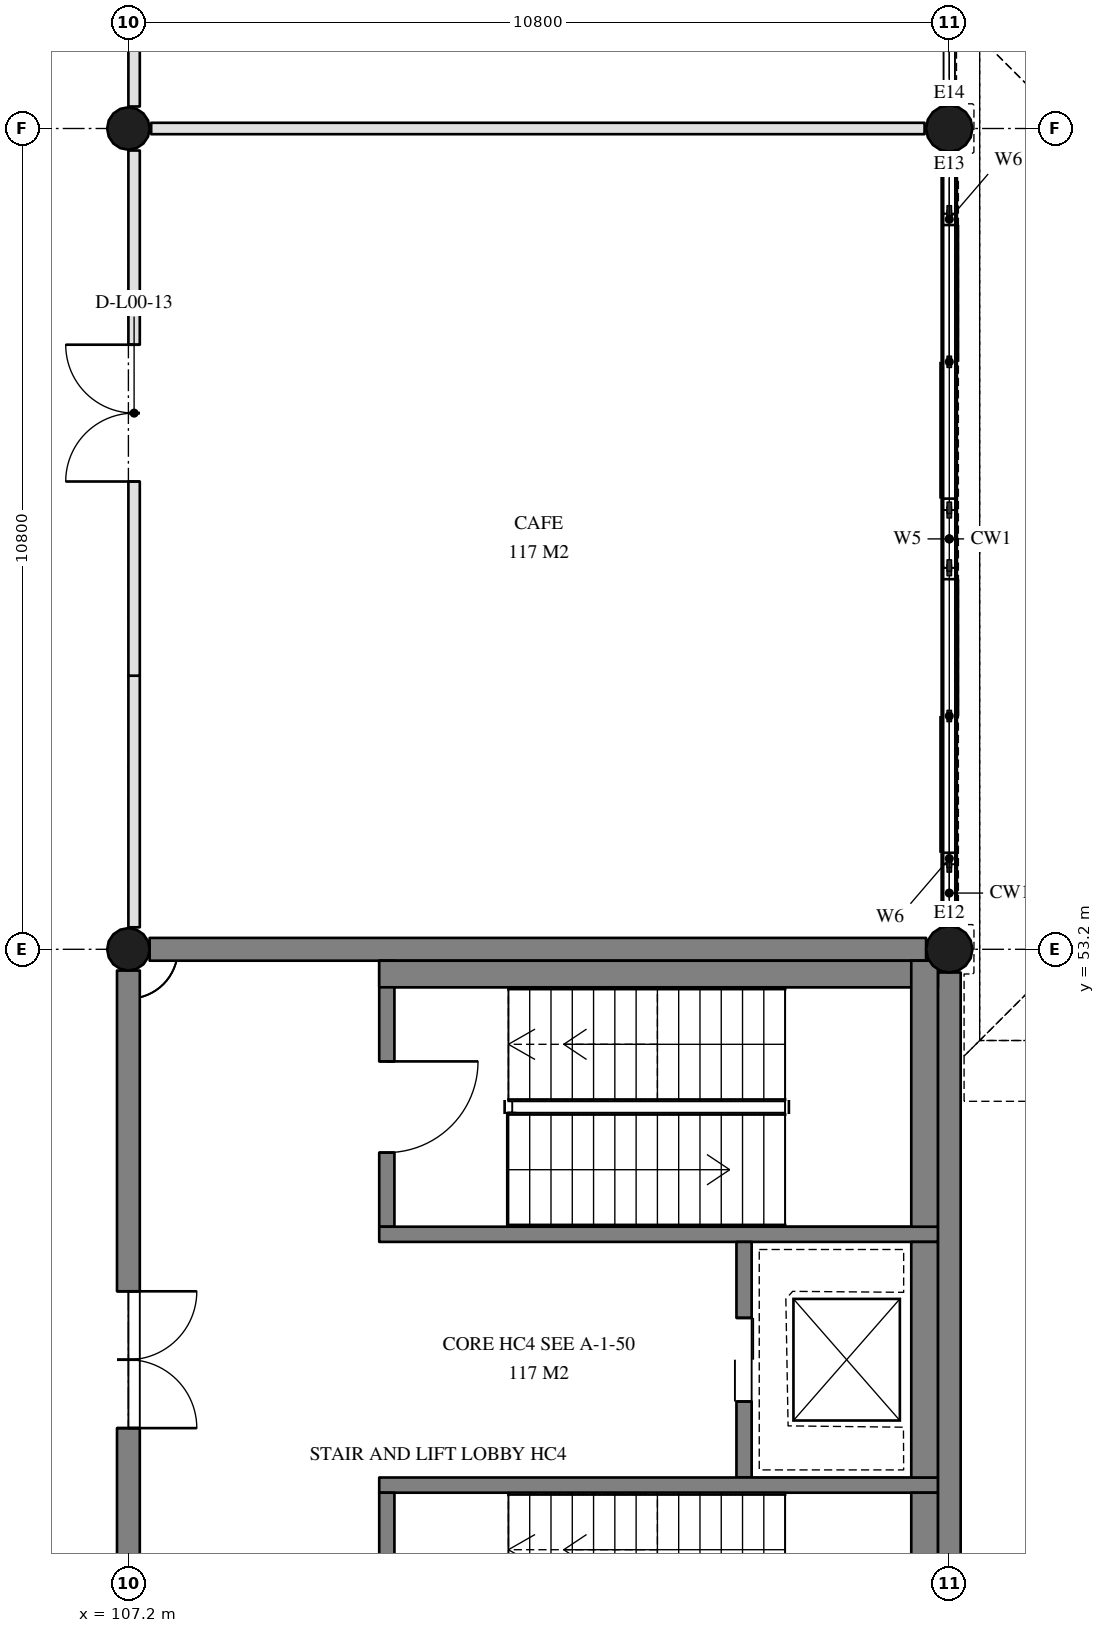
"""IFC4 building model, lengths in metres.
Left out: names, types, materials, properties, quantities, classifications, styles, units other than length and angle.
Written with IfcOpenShell. Run it as: python <this file> out.ifc"""

import sys

from ifc_helpers import new_model, si_unit, direction, frame, frame_2d, origin, origin_2d, place, context, subcontext, project, spatial, rectangle, hollow_circle, extrude, element, fill, save


model = new_model("IFC4")
c1 = context("Model", 3, precision=1e-05, world=origin(), true_north=direction((0.0, 1.0)))
c2 = subcontext(c1, "Body", "Model", "MODEL_VIEW")
j1 = project(units=[si_unit("LENGTHUNIT", "METRE"), si_unit("PLANEANGLEUNIT", "RADIAN")], contexts=[c1])
p1 = place(None, origin())
s1 = spatial("IfcSite", under=j1, at=p1, CompositionType="ELEMENT")
p2 = place(p1, origin())
s2 = spatial("IfcBuilding", under=s1, at=p2, CompositionType="ELEMENT")
p3 = place(p2, origin())
s3 = spatial("IfcBuildingStorey", under=s2, at=p3, CompositionType="ELEMENT", Elevation=0.0)
for number, where, z_axis, x_axis in (
    (1, (107.2, 53.2, 0.0), (0.0, 0.0, 1.0), (1.0, 0.0, 0.0)),
    (2, (107.2, 64.0, 0.0), (0.0, 0.0, 1.0), (1.0, 0.0, 0.0)),
):
    element("IfcColumn", number, at=place(p3, frame(where, z_axis=z_axis, x_axis=x_axis)), inside=s3, PredefinedType="COLUMN", context=c2, shape_type="SweptSolid", body=[
        extrude(hollow_circle(Radius=0.28, WallThickness=0.02, at=origin_2d()), origin(), (0.0, 0.0, 1.0), 4.8),
    ])
for number, where, z_axis, x_axis in (
    (3, (118.0, 53.2, 0.0), (0.0, 0.0, 1.0), (1.0, 0.0, 0.0)),
    (4, (118.0, 64.0, 0.0), (0.0, 0.0, 1.0), (1.0, 0.0, 0.0)),
):
    element("IfcColumn", number, at=place(p3, frame(where, z_axis=z_axis, x_axis=x_axis)), inside=s3, PredefinedType="COLUMN", context=c2, shape_type="SweptSolid", body=[
        extrude(hollow_circle(Radius=0.305, WallThickness=0.025, at=origin_2d()), origin(), (0.0, 0.0, 1.0), 4.8),
    ])
p4 = place(p3, frame((118.0, 42.705, 0.0), z_axis=(0.0, 0.0, 1.0), x_axis=(0.0, 1.0, 0.0)))
e5 = element("IfcWall", 5, at=p4, inside=s3, PredefinedType="SOLIDWALL", context=c2, shape_type="SweptSolid", body=[
    extrude(rectangle(XDim=10.19, YDim=0.3, at=frame_2d((5.095, 0.0))), origin(), (0.0, 0.0, 1.0), 4.8),
])
p5 = place(p3, frame((117.695, 53.2, 0.0), z_axis=(0.0, 0.0, 1.0), x_axis=(-1.0, 0.0, 0.0)))
e6 = element("IfcWall", 6, at=p5, inside=s3, PredefinedType="SOLIDWALL", context=c2, shape_type="SweptSolid", body=[
    extrude(rectangle(XDim=10.216, YDim=0.3, at=frame_2d((5.108, 0.0))), origin(), (0.0, 0.0, 1.0), 4.8),
])
p6 = place(p3, frame((107.2, 52.92, 0.0), z_axis=(0.0, 0.0, 1.0), x_axis=(0.0, -1.0, 0.0)))
e7 = element("IfcWall", 7, at=p6, inside=s3, PredefinedType="SOLIDWALL", context=c2, shape_type="SweptSolid", body=[
    extrude(rectangle(XDim=10.215, YDim=0.3, at=frame_2d((5.108, 0.0))), origin(), (0.0, 0.0, 1.0), 4.8),
])
p7 = place(p6, frame((4.22, 0.0, 0.0)))
e8 = element("IfcOpeningElement", 8, at=p7, cuts=e7, PredefinedType="OPENING", context=c2, shape_type="SweptSolid", body=[
    extrude(rectangle(XDim=1.8, YDim=2.1, at=frame_2d((0.9, 1.05))), frame((0.0, 0.16, 0.0), z_axis=(0.0, -1.0, 0.0), x_axis=(1.0, 0.0, 0.0)), (0.0, 0.0, 1.0), 0.32),
])
p8 = place(p3, frame((118.0, 53.48, 4.5), z_axis=(0.0, 0.0, 1.0), x_axis=(0.0, 1.0, 0.0)))
e9 = element("IfcWall", 9, at=p8, inside=s3, PredefinedType="SOLIDWALL", context=c2, shape_type="SweptSolid", body=[
    extrude(rectangle(XDim=10.24, YDim=0.2, at=frame_2d((5.12, 0.0))), origin(), (0.0, 0.0, 1.0), 0.3),
])
p9 = place(p3, frame((118.0, 54.32, 0.0), z_axis=(0.0, 0.0, 1.0), x_axis=(0.0, 1.0, 0.0)))
e10 = element("IfcWall", 10, at=p9, inside=s3, PredefinedType="SOLIDWALL", context=c2, shape_type="SweptSolid", body=[
    extrude(rectangle(XDim=3.9, YDim=0.15, at=frame_2d((1.95, 0.0))), origin(), (0.0, 0.0, 1.0), 2.6),
])
p10 = place(p9, frame((0.15, 0.0, 0.0)))
e11 = element("IfcOpeningElement", 11, at=p10, cuts=e10, PredefinedType="OPENING", context=c2, shape_type="SweptSolid", body=[
    extrude(rectangle(XDim=3.6, YDim=2.4, at=frame_2d((1.8, 1.2))), frame((0.0, 0.085, 0.0), z_axis=(0.0, -1.0, 0.0), x_axis=(1.0, 0.0, 0.0)), (0.0, 0.0, 1.0), 0.17),
])
p11 = place(p3, frame((118.0, 58.98, 0.0), z_axis=(0.0, 0.0, 1.0), x_axis=(0.0, 1.0, 0.0)))
e12 = element("IfcWall", 12, at=p11, inside=s3, PredefinedType="SOLIDWALL", context=c2, shape_type="SweptSolid", body=[
    extrude(rectangle(XDim=3.9, YDim=0.15, at=frame_2d((1.95, 0.0))), origin(), (0.0, 0.0, 1.0), 2.6),
])
p12 = place(p11, frame((0.15, 0.0, 0.0)))
e13 = element("IfcOpeningElement", 13, at=p12, cuts=e12, PredefinedType="OPENING", context=c2, shape_type="SweptSolid", body=[
    extrude(rectangle(XDim=3.6, YDim=2.4, at=frame_2d((1.8, 1.2))), frame((0.0, 0.085, 0.0), z_axis=(0.0, -1.0, 0.0), x_axis=(1.0, 0.0, 0.0)), (0.0, 0.0, 1.0), 0.17),
])
p13 = place(p3, frame((110.6, 53.05, 0.0), z_axis=(0.0, 0.0, 1.0), x_axis=(0.0, -1.0, 0.0)))
e14 = element("IfcWall", 14, at=p13, inside=s3, PredefinedType="SOLIDWALL", context=c2, shape_type="SweptSolid", body=[
    extrude(rectangle(XDim=3.5, YDim=0.2, at=frame_2d((1.75, 0.0))), origin(), (0.0, 0.0, 1.0), 4.4),
])
p14 = place(p13, frame((1.325, 0.0, 0.0)))
e15 = element("IfcOpeningElement", 15, at=p14, cuts=e14, PredefinedType="OPENING", context=c2, shape_type="SweptSolid", body=[
    extrude(rectangle(XDim=1.2, YDim=2.1, at=frame_2d((0.6, 1.05))), frame((0.0, 0.11, 0.0), z_axis=(0.0, -1.0, 0.0), x_axis=(1.0, 0.0, 0.0)), (0.0, 0.0, 1.0), 0.22),
])
p15 = place(p3, frame((110.5, 49.45, 0.0), z_axis=(0.0, 0.0, 1.0), x_axis=(1.0, 0.0, 0.0)))
e16 = element("IfcWall", 16, at=p15, inside=s3, PredefinedType="SOLIDWALL", context=c2, shape_type="SweptSolid", body=[
    extrude(rectangle(XDim=7.35, YDim=0.2, at=frame_2d((3.675, 0.0))), origin(), (0.0, 0.0, 1.0), 4.4),
])
p16 = place(p3, frame((115.3, 49.35, 0.0), z_axis=(0.0, 0.0, 1.0), x_axis=(0.0, -1.0, 0.0)))
e17 = element("IfcWall", 17, at=p16, inside=s3, PredefinedType="SOLIDWALL", context=c2, shape_type="SweptSolid", body=[
    extrude(rectangle(XDim=3.1, YDim=0.2, at=frame_2d((1.55, 0.0))), origin(), (0.0, 0.0, 1.0), 4.4),
])
p17 = place(p16, frame((1.0, 0.0, 0.0)))
e18 = element("IfcOpeningElement", 18, at=p17, cuts=e17, PredefinedType="OPENING", context=c2, shape_type="SweptSolid", body=[
    extrude(rectangle(XDim=1.1, YDim=2.1, at=frame_2d((0.55, 1.05))), frame((0.0, 0.11, 0.0), z_axis=(0.0, -1.0, 0.0), x_axis=(1.0, 0.0, 0.0)), (0.0, 0.0, 1.0), 0.22),
])
p18 = place(p3, frame((110.5, 46.15, 0.0), z_axis=(0.0, 0.0, 1.0), x_axis=(1.0, 0.0, 0.0)))
e19 = element("IfcWall", 19, at=p18, inside=s3, PredefinedType="SOLIDWALL", context=c2, shape_type="SweptSolid", body=[
    extrude(rectangle(XDim=7.35, YDim=0.2, at=frame_2d((3.675, 0.0))), origin(), (0.0, 0.0, 1.0), 4.4),
])
p19 = place(p3, frame((110.6, 46.05, 0.0), z_axis=(0.0, 0.0, 1.0), x_axis=(0.0, -1.0, 0.0)))
e20 = element("IfcWall", 20, at=p19, inside=s3, PredefinedType="SOLIDWALL", context=c2, shape_type="SweptSolid", body=[
    extrude(rectangle(XDim=3.5, YDim=0.2, at=frame_2d((1.75, 0.0))), origin(), (0.0, 0.0, 1.0), 4.4),
])
p20 = place(p19, frame((0.975, 0.0, 0.0)))
e21 = element("IfcOpeningElement", 21, at=p20, cuts=e20, PredefinedType="OPENING", context=c2, shape_type="SweptSolid", body=[
    extrude(rectangle(XDim=1.2, YDim=2.1, at=frame_2d((0.6, 1.05))), frame((0.0, 0.11, 0.0), z_axis=(0.0, -1.0, 0.0), x_axis=(1.0, 0.0, 0.0)), (0.0, 0.0, 1.0), 0.22),
])
p21 = place(p3, frame((110.5, 52.875, -0.6), z_axis=(0.0, 0.0, 1.0), x_axis=(1.0, 0.0, 0.0)))
e22 = element("IfcWall", 22, at=p21, inside=s3, PredefinedType="SOLIDWALL", context=c2, shape_type="SweptSolid", body=[
    extrude(rectangle(XDim=7.35, YDim=0.35, at=frame_2d((3.675, 0.0))), origin(), (0.0, 0.0, 1.0), 5.0),
])
for number, where, z_axis, x_axis in (
    (23, (117.675, 53.05, -0.6), (0.0, 0.0, 1.0), (0.0, -1.0, 0.0)),
    (24, (117.675, 46.05, -0.6), (0.0, 0.0, 1.0), (0.0, -1.0, 0.0)),
):
    element("IfcWall", number, at=place(p3, frame(where, z_axis=z_axis, x_axis=x_axis)), inside=s3, PredefinedType="SOLIDWALL", context=c2, shape_type="SweptSolid", body=[
        extrude(rectangle(XDim=3.5, YDim=0.35, at=frame_2d((1.75, 0.0))), origin(), (0.0, 0.0, 1.0), 5.0),
    ])
p22 = place(p3, frame((117.675, 49.35, -0.6), z_axis=(0.0, 0.0, 1.0), x_axis=(0.0, -1.0, 0.0)))
e25 = element("IfcWall", 25, at=p22, inside=s3, PredefinedType="SOLIDWALL", context=c2, shape_type="SweptSolid", body=[
    extrude(rectangle(XDim=3.1, YDim=0.35, at=frame_2d((1.55, 0.0))), origin(), (0.0, 0.0, 1.0), 5.0),
])
p23 = place(p3, frame((107.275, 53.49, 0.0), z_axis=(0.0, 0.0, 1.0), x_axis=(0.0, 1.0, 0.0)))
e26 = element("IfcWall", 26, at=p23, inside=s3, PredefinedType="PARTITIONING", context=c2, shape_type="SweptSolid", body=[
    extrude(rectangle(XDim=3.311, YDim=0.15, at=frame_2d((1.655, 0.0))), origin(), (0.0, 0.0, 1.0), 3.9),
])
p24 = place(p3, frame((107.275, 56.8, 0.0), z_axis=(0.0, 0.0, 1.0), x_axis=(0.0, 1.0, 0.0)))
e27 = element("IfcWall", 27, at=p24, inside=s3, PredefinedType="PARTITIONING", context=c2, shape_type="SweptSolid", body=[
    extrude(rectangle(XDim=6.91, YDim=0.15, at=frame_2d((3.455, 0.0))), origin(), (0.0, 0.0, 1.0), 3.9),
])
p25 = place(p24, frame((2.555, 0.0, 0.0)))
e28 = element("IfcOpeningElement", 28, at=p25, cuts=e27, PredefinedType="OPENING", context=c2, shape_type="SweptSolid", body=[
    extrude(rectangle(XDim=1.8, YDim=2.1, at=frame_2d((0.9, 1.05))), frame((0.0, 0.085, 0.0), z_axis=(0.0, -1.0, 0.0), x_axis=(1.0, 0.0, 0.0)), (0.0, 0.0, 1.0), 0.17),
])
p26 = place(p3, frame((107.275, 64.29, 0.0), z_axis=(0.0, 0.0, 1.0), x_axis=(0.0, 1.0, 0.0)))
e29 = element("IfcWall", 29, at=p26, inside=s3, PredefinedType="PARTITIONING", context=c2, shape_type="SweptSolid", body=[
    extrude(rectangle(XDim=8.71, YDim=0.15, at=frame_2d((4.355, 0.0))), origin(), (0.0, 0.0, 1.0), 3.9),
])
p27 = place(p26, frame((3.855, 0.0, 0.0)))
e30 = element("IfcOpeningElement", 30, at=p27, cuts=e29, PredefinedType="OPENING", context=c2, shape_type="SweptSolid", body=[
    extrude(rectangle(XDim=1.0, YDim=2.1, at=frame_2d((0.5, 1.05))), frame((0.0, 0.085, 0.0), z_axis=(0.0, -1.0, 0.0), x_axis=(1.0, 0.0, 0.0)), (0.0, 0.0, 1.0), 0.17),
])
p28 = place(p3, frame((107.5, 64.0, 0.0), z_axis=(0.0, 0.0, 1.0), x_axis=(1.0, 0.0, 0.0)))
e31 = element("IfcWall", 31, at=p28, inside=s3, PredefinedType="PARTITIONING", context=c2, shape_type="SweptSolid", body=[
    extrude(rectangle(XDim=10.176, YDim=0.15, at=frame_2d((5.088, 0.0))), origin(), (0.0, 0.0, 1.0), 3.9),
])
p29 = place(p10, origin())
e32 = element("IfcDoor", 32, at=p29, inside=s3, OperationType="DOUBLE_DOOR_SLIDING", PredefinedType="DOOR", context=c2, shape_type="SweptSolid", body=[
    extrude(rectangle(XDim=3.6, YDim=2.4, at=frame_2d((1.8, 1.2))), frame((0.0, 0.025, 0.0), z_axis=(0.0, -1.0, 0.0), x_axis=(1.0, 0.0, 0.0)), (0.0, 0.0, 1.0), 0.05),
])
fill(e11, e32)
p30 = place(p12, origin())
e33 = element("IfcDoor", 33, at=p30, inside=s3, OperationType="DOUBLE_DOOR_SLIDING", PredefinedType="DOOR", context=c2, shape_type="SweptSolid", body=[
    extrude(rectangle(XDim=3.6, YDim=2.4, at=frame_2d((1.8, 1.2))), frame((0.0, 0.025, 0.0), z_axis=(0.0, -1.0, 0.0), x_axis=(1.0, 0.0, 0.0)), (0.0, 0.0, 1.0), 0.05),
])
fill(e13, e33)
p31 = place(p17, frame((1.1, 0.0, 0.0), z_axis=(0.0, 0.0, 1.0), x_axis=(-1.0, 0.0, 0.0)))
e34 = element("IfcDoor", 34, at=p31, inside=s3, OperationType="DOUBLE_DOOR_SLIDING", PredefinedType="DOOR", context=c2, shape_type="SweptSolid", body=[
    extrude(rectangle(XDim=1.1, YDim=2.1, at=frame_2d((0.55, 1.05))), frame((0.0, 0.025, 0.0), z_axis=(0.0, -1.0, 0.0), x_axis=(1.0, 0.0, 0.0)), (0.0, 0.0, 1.0), 0.05),
])
fill(e18, e34)
p32 = place(p14, frame((1.2, 0.0, 0.0), z_axis=(0.0, 0.0, 1.0), x_axis=(-1.0, 0.0, 0.0)))
e35 = element("IfcDoor", 35, at=p32, inside=s3, OperationType="SINGLE_SWING_LEFT", PredefinedType="DOOR", context=c2, shape_type="SweptSolid", body=[
    extrude(rectangle(XDim=1.2, YDim=2.1, at=frame_2d((0.6, 1.05))), frame((0.0, 0.025, 0.0), z_axis=(0.0, -1.0, 0.0), x_axis=(1.0, 0.0, 0.0)), (0.0, 0.0, 1.0), 0.05),
])
fill(e15, e35)
p33 = place(p7, frame((1.8, 0.0, 0.0), z_axis=(0.0, 0.0, 1.0), x_axis=(-1.0, 0.0, 0.0)))
e36 = element("IfcDoor", 36, at=p33, inside=s3, OperationType="DOUBLE_DOOR_DOUBLE_SWING", PredefinedType="DOOR", context=c2, shape_type="SweptSolid", body=[
    extrude(rectangle(XDim=1.8, YDim=2.1, at=frame_2d((0.9, 1.05))), frame((0.0, 0.025, 0.0), z_axis=(0.0, -1.0, 0.0), x_axis=(1.0, 0.0, 0.0)), (0.0, 0.0, 1.0), 0.05),
])
fill(e8, e36)
p34 = place(p25, origin())
e37 = element("IfcDoor", 37, at=p34, inside=s3, OperationType="DOUBLE_DOOR_DOUBLE_SWING", PredefinedType="DOOR", context=c2, shape_type="SweptSolid", body=[
    extrude(rectangle(XDim=1.8, YDim=2.1, at=frame_2d((0.9, 1.05))), frame((0.0, 0.025, 0.0), z_axis=(0.0, -1.0, 0.0), x_axis=(1.0, 0.0, 0.0)), (0.0, 0.0, 1.0), 0.05),
])
fill(e28, e37)
save(model, sys.argv[1])
